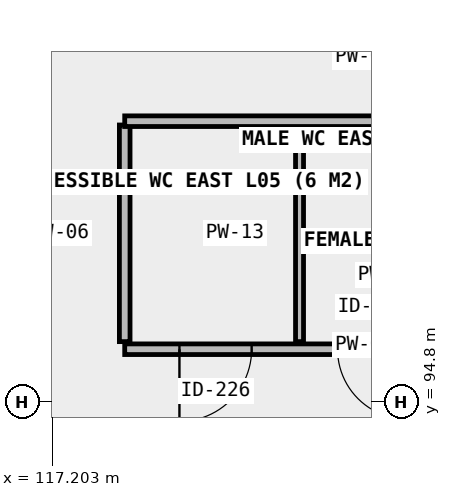
"""IFC4 building model, lengths in metres.
Left out: names, types, materials, properties, quantities, classifications, styles, units other than length and angle.
Written with IfcOpenShell. Run it as: python <this file> out.ifc"""

import sys

from ifc_helpers import new_model, si_unit, direction, frame, frame_2d, origin, place, context, subcontext, project, spatial, rectangle, extrude, element, fill, save


model = new_model("IFC4")
c1 = context("Model", 3, precision=1e-05, world=origin(), true_north=direction((0.0, 1.0)))
c2 = subcontext(c1, "Body", "Model", "MODEL_VIEW")
j1 = project(units=[si_unit("LENGTHUNIT", "METRE"), si_unit("PLANEANGLEUNIT", "RADIAN")], contexts=[c1])
p1 = place(None, origin())
s1 = spatial("IfcSite", under=j1, at=p1, CompositionType="ELEMENT")
p2 = place(p1, origin())
s2 = spatial("IfcBuilding", under=s1, at=p2, CompositionType="ELEMENT")
p3 = place(p2, frame((0.0, 0.0, 22.46)))
s3 = spatial("IfcBuildingStorey", under=s2, at=p3, CompositionType="ELEMENT", Elevation=22.46)
p4 = place(p3, frame((118.15, 95.5, 0.0), z_axis=(0.0, 0.0, 1.0), x_axis=(1.0, 0.0, 0.0)))
e1 = element("IfcWall", 1, at=p4, inside=s3, PredefinedType="PLUMBINGWALL", context=c2, shape_type="SweptSolid", body=[
    extrude(rectangle(XDim=6.3, YDim=0.14, at=frame_2d((3.15, 0.0))), origin(), (0.0, 0.0, 1.0), 4.14),
])
p5 = place(p4, frame((0.72, 0.0, 0.0)))
e2 = element("IfcOpeningElement", 2, at=p5, cuts=e1, PredefinedType="OPENING", context=c2, shape_type="SweptSolid", body=[
    extrude(rectangle(XDim=0.95, YDim=2.1, at=frame_2d((0.475, 1.05))), frame((0.0, 0.08, 0.0), z_axis=(0.0, -1.0, 0.0), x_axis=(1.0, 0.0, 0.0)), (0.0, 0.0, 1.0), 0.16),
])
p6 = place(p4, frame((2.8, 0.0, 0.0)))
e3 = element("IfcOpeningElement", 3, at=p6, cuts=e1, PredefinedType="OPENING", context=c2, shape_type="SweptSolid", body=[
    extrude(rectangle(XDim=0.92, YDim=2.1, at=frame_2d((0.46, 1.05))), frame((0.0, 0.08, 0.0), z_axis=(0.0, -1.0, 0.0), x_axis=(1.0, 0.0, 0.0)), (0.0, 0.0, 1.0), 0.16),
])
p7 = place(p4, frame((4.8, 0.0, 0.0)))
e4 = element("IfcOpeningElement", 4, at=p7, cuts=e1, PredefinedType="OPENING", context=c2, shape_type="SweptSolid", body=[
    extrude(rectangle(XDim=0.92, YDim=2.1, at=frame_2d((0.46, 1.05))), frame((0.0, 0.08, 0.0), z_axis=(0.0, -1.0, 0.0), x_axis=(1.0, 0.0, 0.0)), (0.0, 0.0, 1.0), 0.16),
])
p8 = place(p3, frame((118.15, 95.6, 0.0), z_axis=(0.0, 0.0, 1.0), x_axis=(0.0, 1.0, 0.0)))
e5 = element("IfcWall", 5, at=p8, inside=s3, PredefinedType="PLUMBINGWALL", context=c2, shape_type="SweptSolid", body=[
    extrude(rectangle(XDim=2.85, YDim=0.14, at=frame_2d((1.425, 0.0))), origin(), (0.0, 0.0, 1.0), 4.14),
])
p9 = place(p3, frame((120.45, 95.6, 0.0), z_axis=(0.0, 0.0, 1.0), x_axis=(0.0, 1.0, 0.0)))
e6 = element("IfcWall", 6, at=p9, inside=s3, PredefinedType="PARTITIONING", context=c2, shape_type="SweptSolid", body=[
    extrude(rectangle(XDim=2.85, YDim=0.105, at=frame_2d((1.425, 0.0))), origin(), (0.0, 0.0, 1.0), 4.14),
])
p10 = place(p3, frame((118.15, 98.5, 0.0), z_axis=(0.0, 0.0, 1.0), x_axis=(1.0, 0.0, 0.0)))
e7 = element("IfcWall", 7, at=p10, inside=s3, PredefinedType="PLUMBINGWALL", context=c2, shape_type="SweptSolid", body=[
    extrude(rectangle(XDim=6.3, YDim=0.14, at=frame_2d((3.15, 0.0))), origin(), (0.0, 0.0, 1.0), 4.14),
])
p11 = place(p5, frame((0.475, 0.0, 0.0), z_axis=(0.0, 0.0, 1.0), x_axis=(-1.0, 0.0, 0.0)))
e8 = element("IfcDoor", 8, at=p11, inside=s3, OperationType="SINGLE_SWING_LEFT", PredefinedType="DOOR", context=c2, shape_type="SweptSolid", body=[
    extrude(rectangle(XDim=0.95, YDim=2.1, at=frame_2d((0.0, 1.05))), frame((0.0, 0.025, 0.0), z_axis=(0.0, -1.0, 0.0), x_axis=(1.0, 0.0, 0.0)), (0.0, 0.0, 1.0), 0.05),
])
fill(e2, e8)
p12 = place(p6, origin())
e9 = element("IfcDoor", 9, at=p12, inside=s3, OperationType="SINGLE_SWING_RIGHT", PredefinedType="DOOR", context=c2, shape_type="SweptSolid", body=[
    extrude(rectangle(XDim=0.92, YDim=2.1, at=frame_2d((0.46, 1.05))), frame((0.0, 0.025, 0.0), z_axis=(0.0, -1.0, 0.0), x_axis=(1.0, 0.0, 0.0)), (0.0, 0.0, 1.0), 0.05),
])
fill(e3, e9)
save(model, sys.argv[1])
